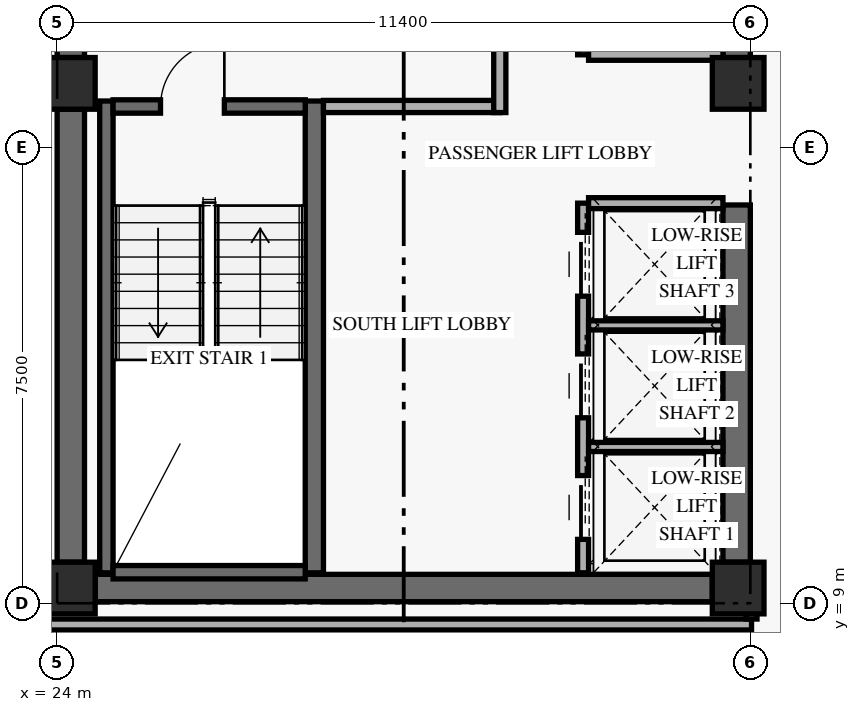
"""IFC4 building model, lengths in metres.
Left out: names, types, materials, properties, quantities, classifications, styles, units other than length and angle.
Written with IfcOpenShell. Run it as: python <this file> out.ifc"""

import sys

from ifc_helpers import new_model, si_unit, direction, frame, frame_2d, origin, origin_2d, place, context, subcontext, project, spatial, rectangle, extrude, element, fill, save


model = new_model("IFC4")
c1 = context("Model", 3, precision=1e-05, world=origin(), true_north=direction((0.0, 1.0)))
c2 = subcontext(c1, "Body", "Model", "MODEL_VIEW")
j1 = project(units=[si_unit("LENGTHUNIT", "METRE"), si_unit("PLANEANGLEUNIT", "RADIAN")], contexts=[c1])
p1 = place(None, origin())
s1 = spatial("IfcSite", under=j1, at=p1, CompositionType="ELEMENT")
p2 = place(p1, origin())
s2 = spatial("IfcBuilding", under=s1, at=p2, CompositionType="ELEMENT")
p3 = place(p2, frame((0.0, 0.0, 49.2)))
s3 = spatial("IfcBuildingStorey", under=s2, at=p3, CompositionType="ELEMENT", Elevation=49.2)
p4 = place(p3, frame((24.225, 9.675, 0.0), z_axis=(0.0, 0.0, 1.0), x_axis=(0.0, 1.0, 0.0)))
e1 = element("IfcWall", 1, at=p4, inside=s3, PredefinedType="SHEAR", context=c2, shape_type="SweptSolid", body=[
    extrude(rectangle(XDim=7.45, YDim=0.45, at=frame_2d((3.725, 0.0))), origin(), (0.0, 0.0, 1.0), 2.667),
])
p5 = place(p3, frame((24.225, 17.975, 0.0), z_axis=(0.0, 0.0, 1.0), x_axis=(0.0, 1.0, 0.0)))
e2 = element("IfcWall", 2, at=p5, inside=s3, PredefinedType="SHEAR", context=c2, shape_type="SweptSolid", body=[
    extrude(rectangle(XDim=11.8, YDim=0.45, at=frame_2d((5.9, 0.0))), origin(), (0.0, 0.0, 1.0), 2.667),
])
p6 = place(p3, frame((35.175, 9.675, 0.0), z_axis=(0.0, 0.0, 1.0), x_axis=(0.0, 1.0, 0.0)))
e3 = element("IfcWall", 3, at=p6, inside=s3, PredefinedType="SHEAR", context=c2, shape_type="SweptSolid", body=[
    extrude(rectangle(XDim=5.875, YDim=0.45, at=frame_2d((2.938, 0.0))), origin(), (0.0, 0.0, 1.0), 2.667),
])
p7 = place(p3, frame((35.175, 17.975, 0.0), z_axis=(0.0, 0.0, 1.0), x_axis=(0.0, 1.0, 0.0)))
e4 = element("IfcWall", 4, at=p7, inside=s3, PredefinedType="SHEAR", context=c2, shape_type="SweptSolid", body=[
    extrude(rectangle(XDim=10.125, YDim=0.45, at=frame_2d((5.062, 0.0))), origin(), (0.0, 0.0, 1.0), 2.667),
])
p8 = place(p3, frame((24.625, 9.25, 0.0), z_axis=(0.0, 0.0, 1.0), x_axis=(1.0, 0.0, 0.0)))
e5 = element("IfcWall", 5, at=p8, inside=s3, PredefinedType="SHEAR", context=c2, shape_type="SweptSolid", body=[
    extrude(rectangle(XDim=10.15, YDim=0.45, at=frame_2d((5.075, 0.0))), origin(), (0.0, 0.0, 1.0), 3.36),
])
p9 = place(p3, frame((24.81, 9.5, 0.0), z_axis=(0.0, 0.0, 1.0), x_axis=(0.0, 1.0, 0.0)))
e6 = element("IfcWall", 6, at=p9, inside=s3, PredefinedType="SHEAR", context=c2, shape_type="SweptSolid", body=[
    extrude(rectangle(XDim=7.76, YDim=0.22, at=frame_2d((3.88, 0.0))), origin(), (0.0, 0.0, 1.0), 3.36),
])
p10 = place(p3, frame((28.23, 9.5, 0.0), z_axis=(0.0, 0.0, 1.0), x_axis=(0.0, 1.0, 0.0)))
e7 = element("IfcWall", 7, at=p10, inside=s3, PredefinedType="SHEAR", context=c2, shape_type="SweptSolid", body=[
    extrude(rectangle(XDim=7.76, YDim=0.3, at=frame_2d((3.88, 0.0))), origin(), (0.0, 0.0, 1.0), 3.36),
])
p11 = place(p3, frame((24.92, 9.51, 0.0), z_axis=(0.0, 0.0, 1.0), x_axis=(1.0, 0.0, 0.0)))
e8 = element("IfcWall", 8, at=p11, inside=s3, PredefinedType="SHEAR", context=c2, shape_type="SweptSolid", body=[
    extrude(rectangle(XDim=3.16, YDim=0.22, at=frame_2d((1.58, 0.0))), origin(), (0.0, 0.0, 1.0), 3.36),
])
p12 = place(p3, frame((24.92, 17.17, 0.0), z_axis=(0.0, 0.0, 1.0), x_axis=(1.0, 0.0, 0.0)))
e9 = element("IfcWall", 9, at=p12, inside=s3, PredefinedType="SHEAR", context=c2, shape_type="SweptSolid", body=[
    extrude(rectangle(XDim=3.16, YDim=0.22, at=frame_2d((1.58, 0.0))), origin(), (0.0, 0.0, 1.0), 3.36),
])
p13 = place(p12, frame((0.78, 0.0, 0.0)))
e10 = element("IfcOpeningElement", 10, at=p13, cuts=e9, PredefinedType="OPENING", context=c2, shape_type="SweptSolid", body=[
    extrude(rectangle(XDim=1.05, YDim=2.15, at=frame_2d((0.525, 1.075))), frame((0.0, 0.12, 0.0), z_axis=(0.0, -1.0, 0.0), x_axis=(1.0, 0.0, 0.0)), (0.0, 0.0, 1.0), 0.24),
])
for number, where, z_axis, x_axis in (
    (11, (24.2, 9.25, 0.0), (0.0, 0.0, 1.0), (1.0, 0.0, 0.0)),
    (12, (24.2, 17.55, 0.0), (0.0, 0.0, 1.0), (1.0, 0.0, 0.0)),
    (13, (35.2, 9.25, 0.0), (0.0, 0.0, 1.0), (1.0, 0.0, 0.0)),
    (14, (35.2, 17.55, 0.0), (0.0, 0.0, 1.0), (1.0, 0.0, 0.0)),
):
    element("IfcColumn", number, at=place(p3, frame(where, z_axis=z_axis, x_axis=x_axis)), inside=s3, PredefinedType="COLUMN", context=c2, shape_type="SweptSolid", body=[
        extrude(rectangle(XDim=0.85, YDim=0.85, at=origin_2d()), origin(), (0.0, 0.0, 1.0), 3.6),
    ])
p14 = place(p3, frame((28.38, 17.17, 0.0), z_axis=(0.0, 0.0, 1.0), x_axis=(1.0, 0.0, 0.0)))
e15 = element("IfcWall", 15, at=p14, inside=s3, PredefinedType="STANDARD", context=c2, shape_type="SweptSolid", body=[
    extrude(rectangle(XDim=2.9, YDim=0.2, at=frame_2d((1.45, 0.0))), origin(), (0.0, 0.0, 1.0), 3.36),
])
p15 = place(p3, frame((31.28, 17.07, 0.0), z_axis=(0.0, 0.0, 1.0), x_axis=(0.0, 1.0, 0.0)))
e16 = element("IfcWall", 16, at=p15, inside=s3, PredefinedType="STANDARD", context=c2, shape_type="SweptSolid", body=[
    extrude(rectangle(XDim=3.92, YDim=0.2, at=frame_2d((1.96, 0.0))), origin(), (0.0, 0.0, 1.0), 2.649),
])
p16 = place(p15, frame((1.35, 0.0, 0.0)))
e17 = element("IfcOpeningElement", 17, at=p16, cuts=e16, PredefinedType="OPENING", context=c2, shape_type="SweptSolid", body=[
    extrude(rectangle(XDim=1.2, YDim=2.15, at=frame_2d((0.6, 1.075))), frame((0.0, 0.11, 0.0), z_axis=(0.0, -1.0, 0.0), x_axis=(1.0, 0.0, 0.0)), (0.0, 0.0, 1.0), 0.22),
])
p17 = place(p3, frame((32.65, 9.5, 0.0), z_axis=(0.0, 0.0, 1.0), x_axis=(0.0, 1.0, 0.0)))
e18 = element("IfcWall", 18, at=p17, inside=s3, PredefinedType="STANDARD", context=c2, shape_type="SweptSolid", body=[
    extrude(rectangle(XDim=6.08, YDim=0.18, at=frame_2d((3.04, 0.0))), origin(), (0.0, 0.0, 1.0), 3.36),
])
p18 = place(p17, frame((0.55, 0.0, 0.0)))
e19 = element("IfcOpeningElement", 19, at=p18, cuts=e18, PredefinedType="OPENING", context=c2, shape_type="SweptSolid", body=[
    extrude(rectangle(XDim=1.05, YDim=2.2, at=frame_2d((0.525, 1.1))), frame((0.0, 0.1, 0.0), z_axis=(0.0, -1.0, 0.0), x_axis=(1.0, 0.0, 0.0)), (0.0, 0.0, 1.0), 0.2),
])
p19 = place(p17, frame((2.55, 0.0, 0.0)))
e20 = element("IfcOpeningElement", 20, at=p19, cuts=e18, PredefinedType="OPENING", context=c2, shape_type="SweptSolid", body=[
    extrude(rectangle(XDim=1.05, YDim=2.2, at=frame_2d((0.525, 1.1))), frame((0.0, 0.1, 0.0), z_axis=(0.0, -1.0, 0.0), x_axis=(1.0, 0.0, 0.0)), (0.0, 0.0, 1.0), 0.2),
])
p20 = place(p17, frame((4.55, 0.0, 0.0)))
e21 = element("IfcOpeningElement", 21, at=p20, cuts=e18, PredefinedType="OPENING", context=c2, shape_type="SweptSolid", body=[
    extrude(rectangle(XDim=1.05, YDim=2.2, at=frame_2d((0.525, 1.1))), frame((0.0, 0.1, 0.0), z_axis=(0.0, -1.0, 0.0), x_axis=(1.0, 0.0, 0.0)), (0.0, 0.0, 1.0), 0.2),
])
p21 = place(p3, frame((32.74, 15.58, 0.0), z_axis=(0.0, 0.0, 1.0), x_axis=(1.0, 0.0, 0.0)))
e22 = element("IfcWall", 22, at=p21, inside=s3, PredefinedType="STANDARD", context=c2, shape_type="SweptSolid", body=[
    extrude(rectangle(XDim=2.21, YDim=0.18, at=frame_2d((1.105, 0.0))), origin(), (0.0, 0.0, 1.0), 3.36),
])
for number, where, z_axis, x_axis in (
    (23, (32.74, 11.57, 0.0), (0.0, 0.0, 1.0), (1.0, 0.0, 0.0)),
    (24, (32.74, 13.57, 0.0), (0.0, 0.0, 1.0), (1.0, 0.0, 0.0)),
):
    element("IfcWall", number, at=place(p3, frame(where, z_axis=z_axis, x_axis=x_axis)), inside=s3, PredefinedType="STANDARD", context=c2, shape_type="SweptSolid", body=[
        extrude(rectangle(XDim=2.21, YDim=0.15, at=frame_2d((1.105, 0.0))), origin(), (0.0, 0.0, 1.0), 3.36),
    ])
p22 = place(p3, frame((32.65, 18.02, 0.0), z_axis=(0.0, 0.0, 1.0), x_axis=(0.0, 1.0, 0.0)))
e25 = element("IfcWall", 25, at=p22, inside=s3, PredefinedType="STANDARD", context=c2, shape_type="SweptSolid", body=[
    extrude(rectangle(XDim=10.06, YDim=0.18, at=frame_2d((5.03, 0.0))), origin(), (0.0, 0.0, 1.0), 3.36),
])
p23 = place(p3, frame((32.74, 18.02, 0.0), z_axis=(0.0, 0.0, 1.0), x_axis=(1.0, 0.0, 0.0)))
e26 = element("IfcWall", 26, at=p23, inside=s3, PredefinedType="STANDARD", context=c2, shape_type="SweptSolid", body=[
    extrude(rectangle(XDim=2.21, YDim=0.18, at=frame_2d((1.105, 0.0))), origin(), (0.0, 0.0, 1.0), 3.36),
])
p24 = place(p3, frame((23.75, 8.65, 0.0), z_axis=(0.0, 0.0, 1.0), x_axis=(1.0, 0.0, 0.0)))
e27 = element("IfcWall", 27, at=p24, inside=s3, PredefinedType="STANDARD", context=c2, shape_type="SweptSolid", body=[
    extrude(rectangle(XDim=11.67, YDim=0.18, at=frame_2d((5.835, 0.0))), origin(), (0.0, 0.0, 1.0), 2.649),
])
p25 = place(p3, frame((35.42, 8.74, 0.0), z_axis=(0.0, 0.0, 1.0), x_axis=(0.0, 1.0, 0.0)))
e28 = element("IfcWall", 28, at=p25, inside=s3, PredefinedType="STANDARD", context=c2, shape_type="SweptSolid", body=[
    extrude(rectangle(XDim=0.51, YDim=0.18, at=frame_2d((0.255, 0.0))), origin(), (0.0, 0.0, 1.0), 3.36),
])
p26 = place(p13, frame((1.05, 0.0, 0.0), z_axis=(0.0, 0.0, 1.0), x_axis=(-1.0, 0.0, 0.0)))
e29 = element("IfcDoor", 29, at=p26, inside=s3, OperationType="SINGLE_SWING_LEFT", PredefinedType="DOOR", context=c2, shape_type="SweptSolid", body=[
    extrude(rectangle(XDim=1.05, YDim=2.15, at=frame_2d((0.525, 1.075))), frame((0.0, 0.025, 0.0), z_axis=(0.0, -1.0, 0.0), x_axis=(1.0, 0.0, 0.0)), (0.0, 0.0, 1.0), 0.05),
])
fill(e10, e29)
p27 = place(p18, origin())
e30 = element("IfcDoor", 30, at=p27, inside=s3, OperationType="SLIDING_TO_LEFT", PredefinedType="DOOR", context=c2, shape_type="SweptSolid", body=[
    extrude(rectangle(XDim=1.05, YDim=2.2, at=frame_2d((0.525, 1.1))), frame((0.0, 0.025, 0.0), z_axis=(0.0, -1.0, 0.0), x_axis=(1.0, 0.0, 0.0)), (0.0, 0.0, 1.0), 0.05),
])
fill(e19, e30)
p28 = place(p19, origin())
e31 = element("IfcDoor", 31, at=p28, inside=s3, OperationType="SLIDING_TO_LEFT", PredefinedType="DOOR", context=c2, shape_type="SweptSolid", body=[
    extrude(rectangle(XDim=1.05, YDim=2.2, at=frame_2d((0.525, 1.1))), frame((0.0, 0.025, 0.0), z_axis=(0.0, -1.0, 0.0), x_axis=(1.0, 0.0, 0.0)), (0.0, 0.0, 1.0), 0.05),
])
fill(e20, e31)
p29 = place(p20, origin())
e32 = element("IfcDoor", 32, at=p29, inside=s3, OperationType="SLIDING_TO_LEFT", PredefinedType="DOOR", context=c2, shape_type="SweptSolid", body=[
    extrude(rectangle(XDim=1.05, YDim=2.2, at=frame_2d((0.525, 1.1))), frame((0.0, 0.025, 0.0), z_axis=(0.0, -1.0, 0.0), x_axis=(1.0, 0.0, 0.0)), (0.0, 0.0, 1.0), 0.05),
])
fill(e21, e32)
save(model, sys.argv[1])
